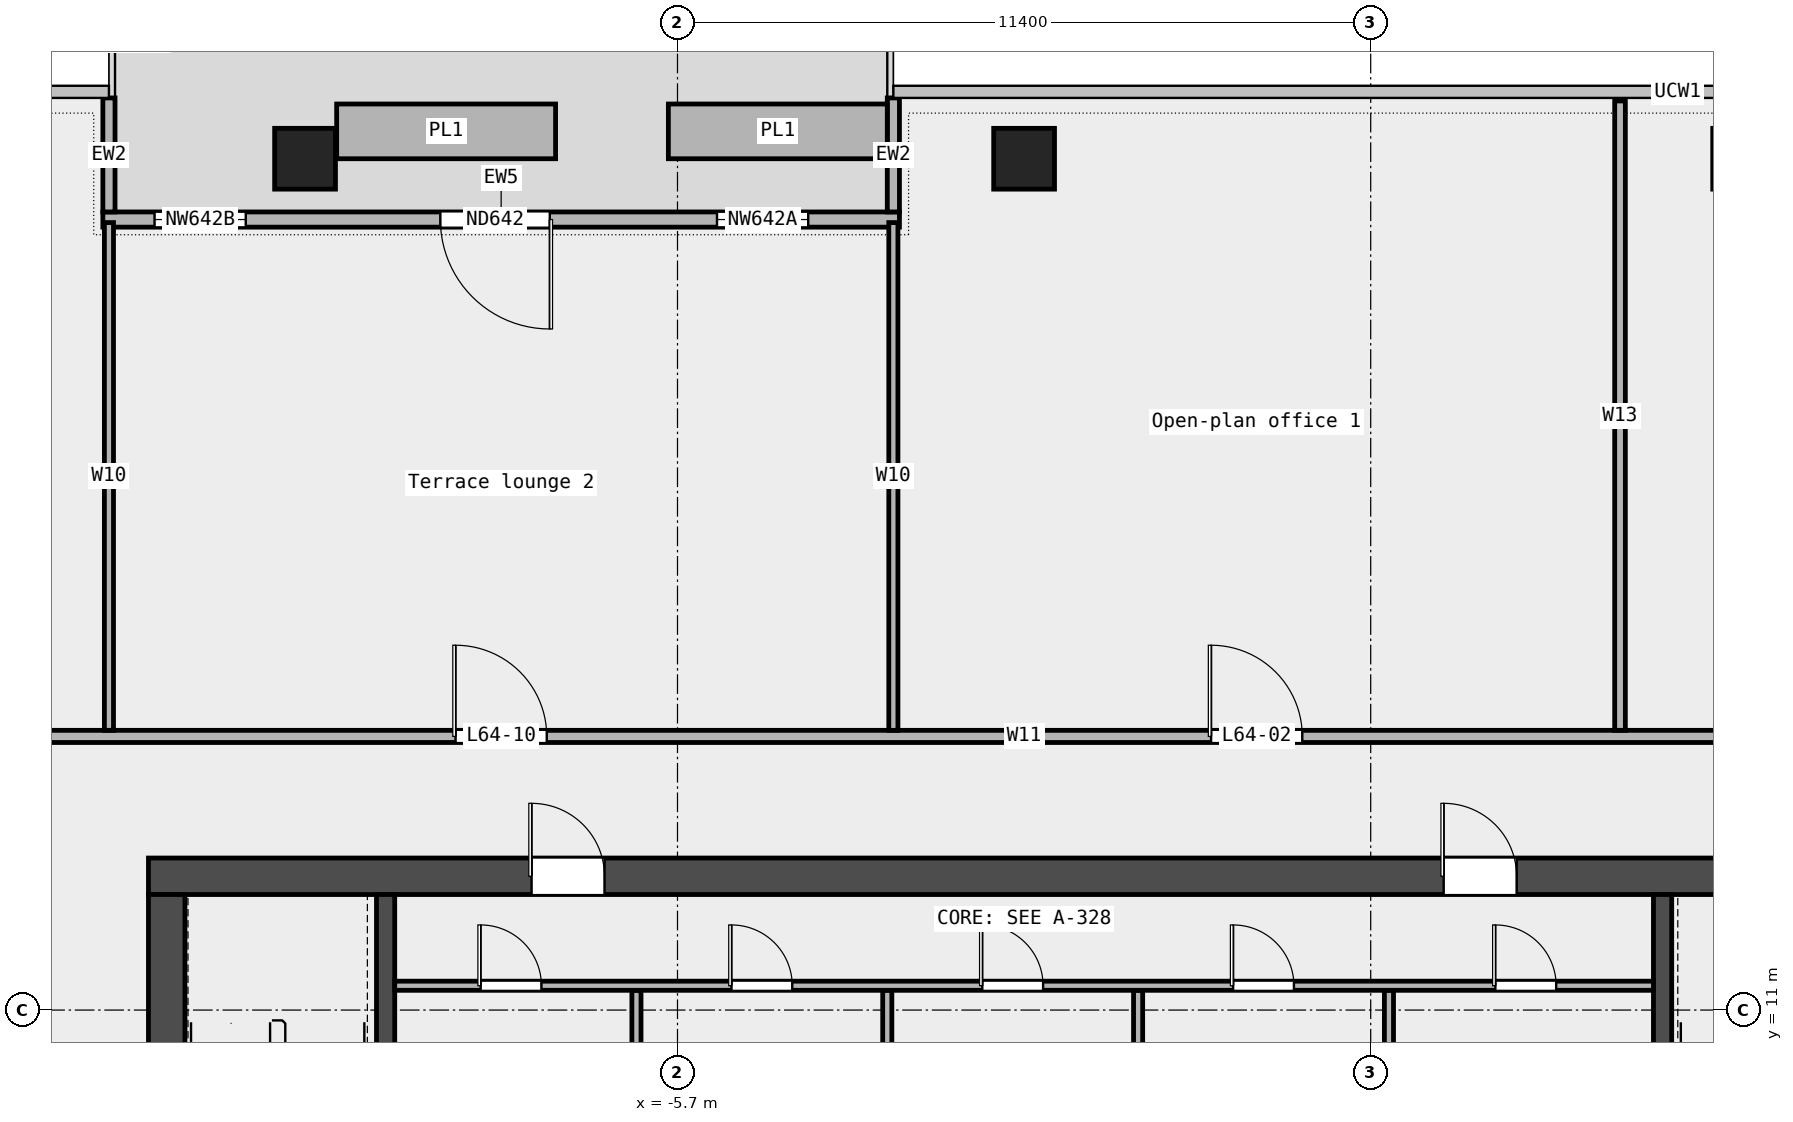
"""IFC4 building model, lengths in metres.
Left out: names, types, materials, properties, quantities, classifications, styles, units other than length and angle.
Written with IfcOpenShell. Run it as: python <this file> out.ifc"""

import sys

from ifc_helpers import new_model, si_unit, direction, frame, frame_2d, origin, origin_2d, place, context, subcontext, project, spatial, rectangle, extrude, element, fill, save


model = new_model("IFC4")
c1 = context("Model", 3, precision=1e-05, world=origin(), true_north=direction((0.0, 1.0)))
c2 = subcontext(c1, "Body", "Model", "MODEL_VIEW")
j1 = project(units=[si_unit("LENGTHUNIT", "METRE"), si_unit("PLANEANGLEUNIT", "RADIAN")], contexts=[c1])
p1 = place(None, origin())
s1 = spatial("IfcSite", under=j1, at=p1, CompositionType="ELEMENT")
p2 = place(p1, origin())
s2 = spatial("IfcBuilding", under=s1, at=p2, CompositionType="ELEMENT")
p3 = place(p2, frame((0.0, 0.0, 295.4)))
s3 = spatial("IfcBuildingStorey", under=s2, at=p3, CompositionType="ELEMENT", Elevation=295.4)
for number, where, z_axis, x_axis in (
    (1, (11.825, 25.0, 0.0), (0.0, 0.0, 1.0), (1.0, 0.0, 0.0)),
    (2, (0.0, 25.0, 0.0), (0.0, 0.0, 1.0), (1.0, 0.0, 0.0)),
    (3, (-11.825, 25.0, 0.0), (0.0, 0.0, 1.0), (1.0, 0.0, 0.0)),
):
    element("IfcColumn", number, at=place(p3, frame(where, z_axis=z_axis, x_axis=x_axis)), inside=s3, PredefinedType="COLUMN", context=c2, shape_type="SweptSolid", body=[
        extrude(rectangle(XDim=1.0, YDim=1.0, at=origin_2d()), origin(), (0.0, 0.0, 1.0), 3.6),
    ])
p4 = place(p3, frame((-2.05, 24.0, 0.0), z_axis=(0.0, 0.0, 1.0), x_axis=(-1.0, 0.0, 0.0)))
e4 = element("IfcWall", 4, at=p4, inside=s3, PredefinedType="STANDARD", context=c2, shape_type="SweptSolid", body=[
    extrude(rectangle(XDim=13.1, YDim=0.25, at=frame_2d((6.55, 0.0))), origin(), (0.0, 0.0, 1.0), 3.6),
])
p5 = place(p4, frame((1.5, 0.0, 0.45)))
e5 = element("IfcOpeningElement", 5, at=p5, cuts=e4, PredefinedType="OPENING", context=c2, shape_type="SweptSolid", body=[
    extrude(rectangle(XDim=1.5, YDim=2.4, at=frame_2d((0.75, 1.2))), frame((0.0, 0.137, 0.0), z_axis=(0.0, -1.0, 0.0), x_axis=(1.0, 0.0, 0.0)), (0.0, 0.0, 1.0), 0.274),
])
p6 = place(p4, frame((5.75, 0.0, 0.0)))
e6 = element("IfcOpeningElement", 6, at=p6, cuts=e4, PredefinedType="OPENING", context=c2, shape_type="SweptSolid", body=[
    extrude(rectangle(XDim=1.8, YDim=2.4, at=frame_2d((0.9, 1.2))), frame((0.0, 0.137, 0.0), z_axis=(0.0, -1.0, 0.0), x_axis=(1.0, 0.0, 0.0)), (0.0, 0.0, 1.0), 0.274),
])
p7 = place(p4, frame((10.75, 0.0, 0.45)))
e7 = element("IfcOpeningElement", 7, at=p7, cuts=e4, PredefinedType="OPENING", context=c2, shape_type="SweptSolid", body=[
    extrude(rectangle(XDim=1.5, YDim=2.4, at=frame_2d((0.75, 1.2))), frame((0.0, 0.137, 0.0), z_axis=(0.0, -1.0, 0.0), x_axis=(1.0, 0.0, 0.0)), (0.0, 0.0, 1.0), 0.274),
])
for number, where, z_axis, x_axis in (
    (8, (-2.15, 26.0, 0.0), (0.0, 0.0, 1.0), (0.0, -1.0, 0.0)),
    (9, (-15.05, 26.0, 0.0), (0.0, 0.0, 1.0), (0.0, -1.0, 0.0)),
):
    element("IfcWall", number, at=place(p3, frame(where, z_axis=z_axis, x_axis=x_axis)), inside=s3, PredefinedType="STANDARD", context=c2, shape_type="SweptSolid", body=[
        extrude(rectangle(XDim=1.875, YDim=0.2, at=frame_2d((0.938, 0.0))), origin(), (0.0, 0.0, 1.0), 3.6),
    ])
for number, where, z_axis, x_axis in (
    (10, (-2.25, 25.45, 0.0), (0.0, 0.0, 1.0), (-1.0, 0.0, 0.0)),
    (11, (-7.705, 25.45, 0.0), (0.0, 0.0, 1.0), (-1.0, 0.0, 0.0)),
):
    element("IfcWall", number, at=place(p3, frame(where, z_axis=z_axis, x_axis=x_axis)), inside=s3, PredefinedType="STANDARD", context=c2, shape_type="SweptSolid", body=[
        extrude(rectangle(XDim=3.6, YDim=0.9, at=frame_2d((1.8, 0.0))), origin(), (0.0, 0.0, 1.0), 0.7),
    ])
p8 = place(p3, frame((-29.6, 15.5, 0.0), z_axis=(0.0, 0.0, 1.0), x_axis=(1.0, 0.0, 0.0)))
e12 = element("IfcWall", 12, at=p8, inside=s3, PredefinedType="PARTITIONING", context=c2, shape_type="SweptSolid", body=[
    extrude(rectangle(XDim=59.2, YDim=0.2, at=frame_2d((29.6, 0.0))), origin(), (0.0, 0.0, 1.0), 3.6),
])
p9 = place(p8, frame((48.3, 0.0, 0.0)))
e13 = element("IfcOpeningElement", 13, at=p9, cuts=e12, PredefinedType="OPENING", context=c2, shape_type="SweptSolid", body=[
    extrude(rectangle(XDim=1.8, YDim=2.1, at=frame_2d((0.9, 1.05))), frame((0.0, 0.112, 0.0), z_axis=(0.0, -1.0, 0.0), x_axis=(1.0, 0.0, 0.0)), (0.0, 0.0, 1.0), 0.224),
])
p10 = place(p8, frame((32.675, 0.0, 0.0)))
e14 = element("IfcOpeningElement", 14, at=p10, cuts=e12, PredefinedType="OPENING", context=c2, shape_type="SweptSolid", body=[
    extrude(rectangle(XDim=1.5, YDim=2.1, at=frame_2d((0.75, 1.05))), frame((0.0, 0.112, 0.0), z_axis=(0.0, -1.0, 0.0), x_axis=(1.0, 0.0, 0.0)), (0.0, 0.0, 1.0), 0.224),
])
p11 = place(p8, frame((6.625, 0.0, 0.0)))
e15 = element("IfcOpeningElement", 15, at=p11, cuts=e12, PredefinedType="OPENING", context=c2, shape_type="SweptSolid", body=[
    extrude(rectangle(XDim=1.5, YDim=2.1, at=frame_2d((0.75, 1.05))), frame((0.0, 0.112, 0.0), z_axis=(0.0, -1.0, 0.0), x_axis=(1.0, 0.0, 0.0)), (0.0, 0.0, 1.0), 0.224),
])
p12 = place(p8, frame((20.25, 0.0, 0.0)))
e16 = element("IfcOpeningElement", 16, at=p12, cuts=e12, PredefinedType="OPENING", context=c2, shape_type="SweptSolid", body=[
    extrude(rectangle(XDim=1.5, YDim=2.1, at=frame_2d((0.75, 1.05))), frame((0.0, 0.112, 0.0), z_axis=(0.0, -1.0, 0.0), x_axis=(1.0, 0.0, 0.0)), (0.0, 0.0, 1.0), 0.224),
])
for number, where, z_axis, x_axis in (
    (17, (-15.05, 15.6, 0.0), (0.0, 0.0, 1.0), (0.0, 1.0, 0.0)),
    (18, (-2.15, 15.6, 0.0), (0.0, 0.0, 1.0), (0.0, 1.0, 0.0)),
):
    element("IfcWall", number, at=place(p3, frame(where, z_axis=z_axis, x_axis=x_axis)), inside=s3, PredefinedType="PARTITIONING", context=c2, shape_type="SweptSolid", body=[
        extrude(rectangle(XDim=8.35, YDim=0.15, at=frame_2d((4.175, 0.0))), origin(), (0.0, 0.0, 1.0), 3.6),
    ])
p13 = place(p3, frame((9.8, 15.6, 0.0), z_axis=(0.0, 0.0, 1.0), x_axis=(0.0, 1.0, 0.0)))
e19 = element("IfcWall", 19, at=p13, inside=s3, PredefinedType="PARTITIONING", context=c2, shape_type="SweptSolid", body=[
    extrude(rectangle(XDim=10.35, YDim=0.175, at=frame_2d((5.175, 0.0))), origin(), (0.0, 0.0, 1.0), 3.6),
])
p14 = place(p3, frame((-14.4, 13.2, 0.0), z_axis=(0.0, 0.0, 1.0), x_axis=(1.0, 0.0, 0.0)))
e20 = element("IfcWall", 20, at=p14, inside=s3, PredefinedType="SHEAR", context=c2, shape_type="SweptSolid", body=[
    extrude(rectangle(XDim=28.8, YDim=0.6, at=frame_2d((14.4, 0.0))), origin(), (0.0, 0.0, 1.0), 3.7),
])
p15 = place(p14, frame((6.3, 0.0, 0.0)))
e21 = element("IfcOpeningElement", 21, at=p15, cuts=e20, PredefinedType="OPENING", context=c2, shape_type="SweptSolid", body=[
    extrude(rectangle(XDim=1.2, YDim=2.1, at=frame_2d((0.6, 1.05))), frame((0.0, 0.312, 0.0), z_axis=(0.0, -1.0, 0.0), x_axis=(1.0, 0.0, 0.0)), (0.0, 0.0, 1.0), 0.624),
])
p16 = place(p14, frame((21.3, 0.0, 0.0)))
e22 = element("IfcOpeningElement", 22, at=p16, cuts=e20, PredefinedType="OPENING", context=c2, shape_type="SweptSolid", body=[
    extrude(rectangle(XDim=1.2, YDim=2.1, at=frame_2d((0.6, 1.05))), frame((0.0, 0.312, 0.0), z_axis=(0.0, -1.0, 0.0), x_axis=(1.0, 0.0, 0.0)), (0.0, 0.0, 1.0), 0.624),
])
p17 = place(p3, frame((-14.1, -6.6, 0.0), z_axis=(0.0, 0.0, 1.0), x_axis=(0.0, 1.0, 0.0)))
e23 = element("IfcWall", 23, at=p17, inside=s3, PredefinedType="SHEAR", context=c2, shape_type="SweptSolid", body=[
    extrude(rectangle(XDim=19.5, YDim=0.6, at=frame_2d((9.75, 0.0))), origin(), (0.0, 0.0, 1.0), 3.7),
])
p18 = place(p17, frame((9.3, 0.0, 0.0)))
e24 = element("IfcOpeningElement", 24, at=p18, cuts=e23, PredefinedType="OPENING", context=c2, shape_type="SweptSolid", body=[
    extrude(rectangle(XDim=1.8, YDim=2.1, at=frame_2d((0.9, 1.05))), frame((0.0, 0.312, 0.0), z_axis=(0.0, -1.0, 0.0), x_axis=(1.0, 0.0, 0.0)), (0.0, 0.0, 1.0), 0.624),
])
for number, where, z_axis, x_axis in (
    (25, (-10.5, 5.25, 0.0), (0.0, 0.0, 1.0), (0.0, 1.0, 0.0)),
    (26, (10.5, 5.25, 0.0), (0.0, 0.0, 1.0), (0.0, 1.0, 0.0)),
):
    element("IfcWall", number, at=place(p3, frame(where, z_axis=z_axis, x_axis=x_axis)), inside=s3, PredefinedType="SHEAR", context=c2, shape_type="SweptSolid", body=[
        extrude(rectangle(XDim=7.65, YDim=0.3, at=frame_2d((3.825, 0.0))), origin(), (0.0, 0.0, 1.0), 3.7),
    ])
for number, where, z_axis, x_axis in (
    (27, (-6.375, 8.55, 0.0), (0.0, 0.0, 1.0), (0.0, 1.0, 0.0)),
    (28, (-2.25, 8.55, 0.0), (0.0, 0.0, 1.0), (0.0, 1.0, 0.0)),
    (29, (1.875, 8.55, 0.0), (0.0, 0.0, 1.0), (0.0, 1.0, 0.0)),
    (30, (6.0, 8.55, 0.0), (0.0, 0.0, 1.0), (0.0, 1.0, 0.0)),
):
    element("IfcWall", number, at=place(p3, frame(where, z_axis=z_axis, x_axis=x_axis)), inside=s3, PredefinedType="PARTITIONING", context=c2, shape_type="SweptSolid", body=[
        extrude(rectangle(XDim=2.775, YDim=0.15, at=frame_2d((1.387, 0.0))), origin(), (0.0, 0.0, 1.0), 3.7),
    ])
p19 = place(p3, frame((-10.35, 11.4, 0.0), z_axis=(0.0, 0.0, 1.0), x_axis=(1.0, 0.0, 0.0)))
e31 = element("IfcWall", 31, at=p19, inside=s3, PredefinedType="PARTITIONING", context=c2, shape_type="SweptSolid", body=[
    extrude(rectangle(XDim=20.7, YDim=0.15, at=frame_2d((10.35, 0.0))), origin(), (0.0, 0.0, 1.0), 3.7),
])
p20 = place(p19, frame((1.413, 0.0, 0.0)))
e32 = element("IfcOpeningElement", 32, at=p20, cuts=e31, PredefinedType="OPENING", context=c2, shape_type="SweptSolid", body=[
    extrude(rectangle(XDim=1.0, YDim=2.1, at=frame_2d((0.5, 1.05))), frame((0.0, 0.087, 0.0), z_axis=(0.0, -1.0, 0.0), x_axis=(1.0, 0.0, 0.0)), (0.0, 0.0, 1.0), 0.174),
])
p21 = place(p19, frame((5.538, 0.0, 0.0)))
e33 = element("IfcOpeningElement", 33, at=p21, cuts=e31, PredefinedType="OPENING", context=c2, shape_type="SweptSolid", body=[
    extrude(rectangle(XDim=1.0, YDim=2.1, at=frame_2d((0.5, 1.05))), frame((0.0, 0.087, 0.0), z_axis=(0.0, -1.0, 0.0), x_axis=(1.0, 0.0, 0.0)), (0.0, 0.0, 1.0), 0.174),
])
p22 = place(p19, frame((9.663, 0.0, 0.0)))
e34 = element("IfcOpeningElement", 34, at=p22, cuts=e31, PredefinedType="OPENING", context=c2, shape_type="SweptSolid", body=[
    extrude(rectangle(XDim=1.0, YDim=2.1, at=frame_2d((0.5, 1.05))), frame((0.0, 0.087, 0.0), z_axis=(0.0, -1.0, 0.0), x_axis=(1.0, 0.0, 0.0)), (0.0, 0.0, 1.0), 0.174),
])
p23 = place(p19, frame((13.788, 0.0, 0.0)))
e35 = element("IfcOpeningElement", 35, at=p23, cuts=e31, PredefinedType="OPENING", context=c2, shape_type="SweptSolid", body=[
    extrude(rectangle(XDim=1.0, YDim=2.1, at=frame_2d((0.5, 1.05))), frame((0.0, 0.087, 0.0), z_axis=(0.0, -1.0, 0.0), x_axis=(1.0, 0.0, 0.0)), (0.0, 0.0, 1.0), 0.174),
])
p24 = place(p19, frame((18.1, 0.0, 0.0)))
e36 = element("IfcOpeningElement", 36, at=p24, cuts=e31, PredefinedType="OPENING", context=c2, shape_type="SweptSolid", body=[
    extrude(rectangle(XDim=1.0, YDim=2.1, at=frame_2d((0.5, 1.05))), frame((0.0, 0.087, 0.0), z_axis=(0.0, -1.0, 0.0), x_axis=(1.0, 0.0, 0.0)), (0.0, 0.0, 1.0), 0.174),
])
p25 = place(p5, origin())
e37 = element("IfcWindow", 37, at=p25, inside=s3, PartitioningType="SINGLE_PANEL", PredefinedType="WINDOW", context=c2, shape_type="SweptSolid", body=[
    extrude(rectangle(XDim=1.5, YDim=2.4, at=frame_2d((0.75, 1.2))), frame((0.0, 0.03, 0.0), z_axis=(0.0, -1.0, 0.0), x_axis=(1.0, 0.0, 0.0)), (0.0, 0.0, 1.0), 0.06),
])
fill(e5, e37)
p26 = place(p6, origin())
e38 = element("IfcDoor", 38, at=p26, inside=s3, OperationType="DOUBLE_DOOR_SINGLE_SWING", PredefinedType="DOOR", context=c2, shape_type="SweptSolid", body=[
    extrude(rectangle(XDim=1.8, YDim=2.4, at=frame_2d((0.9, 1.2))), frame((0.0, 0.025, 0.0), z_axis=(0.0, -1.0, 0.0), x_axis=(1.0, 0.0, 0.0)), (0.0, 0.0, 1.0), 0.05),
])
fill(e6, e38)
p27 = place(p7, origin())
e39 = element("IfcWindow", 39, at=p27, inside=s3, PartitioningType="SINGLE_PANEL", PredefinedType="WINDOW", context=c2, shape_type="SweptSolid", body=[
    extrude(rectangle(XDim=1.5, YDim=2.4, at=frame_2d((0.75, 1.2))), frame((0.0, 0.03, 0.0), z_axis=(0.0, -1.0, 0.0), x_axis=(1.0, 0.0, 0.0)), (0.0, 0.0, 1.0), 0.06),
])
fill(e7, e39)
p28 = place(p10, origin())
e40 = element("IfcDoor", 40, at=p28, inside=s3, OperationType="DOUBLE_DOOR_SINGLE_SWING", PredefinedType="DOOR", context=c2, shape_type="SweptSolid", body=[
    extrude(rectangle(XDim=1.5, YDim=2.1, at=frame_2d((0.75, 1.05))), frame((0.0, 0.025, 0.0), z_axis=(0.0, -1.0, 0.0), x_axis=(1.0, 0.0, 0.0)), (0.0, 0.0, 1.0), 0.05),
])
fill(e14, e40)
p29 = place(p12, origin())
e41 = element("IfcDoor", 41, at=p29, inside=s3, OperationType="DOUBLE_DOOR_SINGLE_SWING", PredefinedType="DOOR", context=c2, shape_type="SweptSolid", body=[
    extrude(rectangle(XDim=1.5, YDim=2.1, at=frame_2d((0.75, 1.05))), frame((0.0, 0.025, 0.0), z_axis=(0.0, -1.0, 0.0), x_axis=(1.0, 0.0, 0.0)), (0.0, 0.0, 1.0), 0.05),
])
fill(e16, e41)
p30 = place(p20, origin())
e42 = element("IfcDoor", 42, at=p30, inside=s3, OperationType="SINGLE_SWING_LEFT", PredefinedType="DOOR", context=c2, shape_type="SweptSolid", body=[
    extrude(rectangle(XDim=1.0, YDim=2.1, at=frame_2d((0.5, 1.05))), frame((0.0, 0.025, 0.0), z_axis=(0.0, -1.0, 0.0), x_axis=(1.0, 0.0, 0.0)), (0.0, 0.0, 1.0), 0.05),
])
fill(e32, e42)
p31 = place(p21, origin())
e43 = element("IfcDoor", 43, at=p31, inside=s3, OperationType="SINGLE_SWING_LEFT", PredefinedType="DOOR", context=c2, shape_type="SweptSolid", body=[
    extrude(rectangle(XDim=1.0, YDim=2.1, at=frame_2d((0.5, 1.05))), frame((0.0, 0.025, 0.0), z_axis=(0.0, -1.0, 0.0), x_axis=(1.0, 0.0, 0.0)), (0.0, 0.0, 1.0), 0.05),
])
fill(e33, e43)
p32 = place(p22, origin())
e44 = element("IfcDoor", 44, at=p32, inside=s3, OperationType="SINGLE_SWING_LEFT", PredefinedType="DOOR", context=c2, shape_type="SweptSolid", body=[
    extrude(rectangle(XDim=1.0, YDim=2.1, at=frame_2d((0.5, 1.05))), frame((0.0, 0.025, 0.0), z_axis=(0.0, -1.0, 0.0), x_axis=(1.0, 0.0, 0.0)), (0.0, 0.0, 1.0), 0.05),
])
fill(e34, e44)
p33 = place(p23, origin())
e45 = element("IfcDoor", 45, at=p33, inside=s3, OperationType="SINGLE_SWING_LEFT", PredefinedType="DOOR", context=c2, shape_type="SweptSolid", body=[
    extrude(rectangle(XDim=1.0, YDim=2.1, at=frame_2d((0.5, 1.05))), frame((0.0, 0.025, 0.0), z_axis=(0.0, -1.0, 0.0), x_axis=(1.0, 0.0, 0.0)), (0.0, 0.0, 1.0), 0.05),
])
fill(e35, e45)
p34 = place(p24, origin())
e46 = element("IfcDoor", 46, at=p34, inside=s3, OperationType="SINGLE_SWING_LEFT", PredefinedType="DOOR", context=c2, shape_type="SweptSolid", body=[
    extrude(rectangle(XDim=1.0, YDim=2.1, at=frame_2d((0.5, 1.05))), frame((0.0, 0.025, 0.0), z_axis=(0.0, -1.0, 0.0), x_axis=(1.0, 0.0, 0.0)), (0.0, 0.0, 1.0), 0.05),
])
fill(e36, e46)
p35 = place(p15, origin())
e47 = element("IfcDoor", 47, at=p35, inside=s3, OperationType="SINGLE_SWING_LEFT", PredefinedType="DOOR", context=c2, shape_type="SweptSolid", body=[
    extrude(rectangle(XDim=1.2, YDim=2.1, at=frame_2d((0.6, 1.05))), frame((0.0, 0.025, 0.0), z_axis=(0.0, -1.0, 0.0), x_axis=(1.0, 0.0, 0.0)), (0.0, 0.0, 1.0), 0.05),
])
fill(e21, e47)
p36 = place(p16, origin())
e48 = element("IfcDoor", 48, at=p36, inside=s3, OperationType="SINGLE_SWING_RIGHT", PredefinedType="DOOR", context=c2, shape_type="SweptSolid", body=[
    extrude(rectangle(XDim=1.2, YDim=2.1, at=frame_2d((0.6, 1.05))), frame((0.0, 0.025, 0.0), z_axis=(0.0, -1.0, 0.0), x_axis=(1.0, 0.0, 0.0)), (0.0, 0.0, 1.0), 0.05),
])
fill(e22, e48)
save(model, sys.argv[1])
